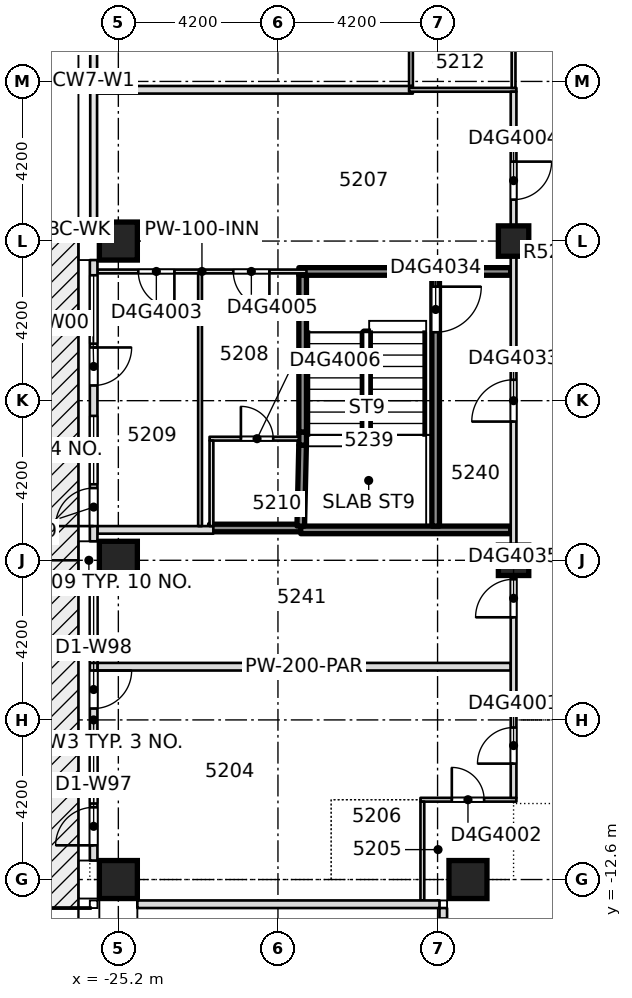
"""IFC4 building model, lengths in metres.
Left out: names, types, materials, properties, quantities, classifications, styles, units other than length and angle.
Written with IfcOpenShell. Run it as: python <this file> out.ifc"""

import sys

from ifc_helpers import new_model, si_unit, direction, frame, frame_2d, origin, origin_2d, place, context, subcontext, project, spatial, rectangle, extrude, element, fill, save


model = new_model("IFC4")
c1 = context("Model", 3, precision=1e-05, world=origin(), true_north=direction((0.0, 1.0)))
c2 = subcontext(c1, "Body", "Model", "MODEL_VIEW")
j1 = project(units=[si_unit("LENGTHUNIT", "METRE"), si_unit("PLANEANGLEUNIT", "RADIAN")], contexts=[c1])
p1 = place(None, origin())
s1 = spatial("IfcSite", under=j1, at=p1, CompositionType="ELEMENT")
p2 = place(p1, origin())
s2 = spatial("IfcBuilding", under=s1, at=p2, CompositionType="ELEMENT")
p3 = place(p2, frame((0.0, 0.0, 199.7)))
s3 = spatial("IfcBuildingStorey", under=s2, at=p3, CompositionType="ELEMENT", Elevation=199.7)
for number, where, z_axis, x_axis in (
    (1, (-25.2, -12.6, -0.4), (0.0, 0.0, 1.0), (1.0, 0.0, 0.0)),
    (2, (-16.0, -12.6, -0.4), (0.0, 0.0, 1.0), (1.0, 0.0, 0.0)),
    (3, (-25.2, -4.2, -0.4), (0.0, 0.0, 1.0), (1.0, 0.0, 0.0)),
    (4, (-25.2, 4.2, -0.4), (0.0, 0.0, 1.0), (1.0, 0.0, 0.0)),
):
    element("IfcColumn", number, at=place(p3, frame(where, z_axis=z_axis, x_axis=x_axis)), inside=s3, PredefinedType="COLUMN", context=c2, shape_type="SweptSolid", body=[
        extrude(rectangle(XDim=1.0, YDim=1.0, at=origin_2d()), origin(), (0.0, 0.0, 1.0), 3.45),
    ])
for number, where, z_axis, x_axis in (
    (5, (-14.8, -4.2, -0.4), (0.0, 0.0, 1.0), (1.0, 0.0, 0.0)),
    (6, (-14.8, 4.2, -0.4), (0.0, 0.0, 1.0), (1.0, 0.0, 0.0)),
):
    element("IfcColumn", number, at=place(p3, frame(where, z_axis=z_axis, x_axis=x_axis)), inside=s3, PredefinedType="COLUMN", context=c2, shape_type="SweptSolid", body=[
        extrude(rectangle(XDim=0.8, YDim=0.8, at=origin_2d()), origin(), (0.0, 0.0, 1.0), 3.45),
    ])
p4 = place(p3, frame((-17.25, -10.5, 0.0), z_axis=(0.0, 0.0, 1.0), x_axis=(1.0, 0.0, 0.0)))
e7 = element("IfcWall", 7, at=p4, inside=s3, PredefinedType="PARTITIONING", context=c2, shape_type="SweptSolid", body=[
    extrude(rectangle(XDim=2.525, YDim=0.1, at=frame_2d((1.262, 0.0))), origin(), (0.0, 0.0, 1.0), 3.05),
])
p5 = place(p4, frame((0.825, 0.0, 0.0)))
e8 = element("IfcOpeningElement", 8, at=p5, cuts=e7, PredefinedType="OPENING", context=c2, shape_type="SweptSolid", body=[
    extrude(rectangle(XDim=0.85, YDim=2.1, at=frame_2d((0.425, 1.05))), frame((0.0, 0.06, 0.0), z_axis=(0.0, -1.0, 0.0), x_axis=(1.0, 0.0, 0.0)), (0.0, 0.0, 1.0), 0.12),
])
p6 = place(p3, frame((-25.75, -7.0, 0.0), z_axis=(0.0, 0.0, 1.0), x_axis=(1.0, 0.0, 0.0)))
e9 = element("IfcWall", 9, at=p6, inside=s3, PredefinedType="PARTITIONING", context=c2, shape_type="SweptSolid", body=[
    extrude(rectangle(XDim=10.875, YDim=0.2, at=frame_2d((5.438, 0.0))), origin(), (0.0, 0.0, 1.0), 3.05),
])
p7 = place(p3, frame((-25.75, -3.4, 0.0), z_axis=(0.0, 0.0, 1.0), x_axis=(1.0, 0.0, 0.0)))
e10 = element("IfcWall", 10, at=p7, inside=s3, PredefinedType="PARTITIONING", context=c2, shape_type="SweptSolid", body=[
    extrude(rectangle(XDim=3.05, YDim=0.2, at=frame_2d((1.525, 0.0))), origin(), (0.0, 0.0, 1.0), 3.05),
])
p8 = place(p3, frame((-22.8, -3.35, 0.0), z_axis=(0.0, 0.0, 1.0), x_axis=(1.0, 0.0, 0.0)))
e11 = element("IfcWall", 11, at=p8, inside=s3, PredefinedType="SOLIDWALL", context=c2, shape_type="SweptSolid", body=[
    extrude(rectangle(XDim=2.5, YDim=0.2, at=frame_2d((1.25, 0.0))), origin(), (0.0, 0.0, 1.0), 3.05),
])
p9 = place(p3, frame((-20.4, -3.4, 0.0), z_axis=(0.0, 0.0, 1.0), x_axis=(1.0, 0.0, 0.0)))
e12 = element("IfcWall", 12, at=p9, inside=s3, PredefinedType="SOLIDWALL", context=c2, shape_type="SweptSolid", body=[
    extrude(rectangle(XDim=5.525, YDim=0.2, at=frame_2d((2.762, 0.0))), origin(), (0.0, 0.0, 1.0), 3.05),
])
p10 = place(p3, frame((-22.8, -1.0, 0.0), z_axis=(0.0, 0.0, 1.0), x_axis=(1.0, 0.0, 0.0)))
e13 = element("IfcWall", 13, at=p10, inside=s3, PredefinedType="PARTITIONING", context=c2, shape_type="SweptSolid", body=[
    extrude(rectangle(XDim=2.35, YDim=0.1, at=frame_2d((1.175, 0.0))), origin(), (0.0, 0.0, 1.0), 3.05),
])
p11 = place(p10, frame((0.825, 0.0, 0.0)))
e14 = element("IfcOpeningElement", 14, at=p11, cuts=e13, PredefinedType="OPENING", context=c2, shape_type="SweptSolid", body=[
    extrude(rectangle(XDim=0.85, YDim=2.1, at=frame_2d((0.425, 1.05))), frame((0.0, 0.06, 0.0), z_axis=(0.0, -1.0, 0.0), x_axis=(1.0, 0.0, 0.0)), (0.0, 0.0, 1.0), 0.12),
])
p12 = place(p3, frame((-25.75, 3.4, 0.0), z_axis=(0.0, 0.0, 1.0), x_axis=(1.0, 0.0, 0.0)))
e15 = element("IfcWall", 15, at=p12, inside=s3, PredefinedType="PARTITIONING", context=c2, shape_type="SweptSolid", body=[
    extrude(rectangle(XDim=5.5, YDim=0.1, at=frame_2d((2.75, 0.0))), origin(), (0.0, 0.0, 1.0), 3.05),
])
p13 = place(p12, frame((1.075, 0.0, 0.0)))
e16 = element("IfcOpeningElement", 16, at=p13, cuts=e15, PredefinedType="OPENING", context=c2, shape_type="SweptSolid", body=[
    extrude(rectangle(XDim=0.95, YDim=2.1, at=frame_2d((0.475, 1.05))), frame((0.0, 0.06, 0.0), z_axis=(0.0, -1.0, 0.0), x_axis=(1.0, 0.0, 0.0)), (0.0, 0.0, 1.0), 0.12),
])
p14 = place(p12, frame((3.575, 0.0, 0.0)))
e17 = element("IfcOpeningElement", 17, at=p14, cuts=e15, PredefinedType="OPENING", context=c2, shape_type="SweptSolid", body=[
    extrude(rectangle(XDim=0.95, YDim=2.1, at=frame_2d((0.475, 1.05))), frame((0.0, 0.06, 0.0), z_axis=(0.0, -1.0, 0.0), x_axis=(1.0, 0.0, 0.0)), (0.0, 0.0, 1.0), 0.12),
])
p15 = place(p3, frame((-20.45, 3.4, 0.0), z_axis=(0.0, 0.0, 1.0), x_axis=(1.0, 0.0, 0.0)))
e18 = element("IfcWall", 18, at=p15, inside=s3, PredefinedType="SOLIDWALL", context=c2, shape_type="SweptSolid", body=[
    extrude(rectangle(XDim=5.575, YDim=0.2, at=frame_2d((2.788, 0.0))), origin(), (0.0, 0.0, 1.0), 3.05),
])
p16 = place(p3, frame((-25.75, 8.18, 0.0), z_axis=(0.0, 0.0, 1.0), x_axis=(1.0, 0.0, 0.0)))
e19 = element("IfcWall", 19, at=p16, inside=s3, PredefinedType="PARTITIONING", context=c2, shape_type="SweptSolid", body=[
    extrude(rectangle(XDim=8.3, YDim=0.2, at=frame_2d((4.15, 0.0))), origin(), (0.0, 0.0, 1.0), 3.05),
])
p17 = place(p3, frame((-17.55, 8.18, 0.0), z_axis=(0.0, 0.0, 1.0), x_axis=(1.0, 0.0, 0.0)))
e20 = element("IfcWall", 20, at=p17, inside=s3, PredefinedType="PARTITIONING", context=c2, shape_type="SweptSolid", body=[
    extrude(rectangle(XDim=2.825, YDim=0.1, at=frame_2d((1.413, 0.0))), origin(), (0.0, 0.0, 1.0), 3.05),
])
p18 = place(p3, frame((-23.05, -3.3, 0.0), z_axis=(0.0, 0.0, 1.0), x_axis=(0.0, 1.0, 0.0)))
e21 = element("IfcWall", 21, at=p18, inside=s3, PredefinedType="PARTITIONING", context=c2, shape_type="SweptSolid", body=[
    extrude(rectangle(XDim=6.65, YDim=0.1, at=frame_2d((3.325, 0.0))), origin(), (0.0, 0.0, 1.0), 3.05),
])
p19 = place(p3, frame((-22.75, -3.3, 0.0), z_axis=(0.0, 0.0, 1.0), x_axis=(0.0, 1.0, 0.0)))
e22 = element("IfcWall", 22, at=p19, inside=s3, PredefinedType="PARTITIONING", context=c2, shape_type="SweptSolid", body=[
    extrude(rectangle(XDim=2.25, YDim=0.1, at=frame_2d((1.125, 0.0))), origin(), (0.0, 0.0, 1.0), 3.05),
])
p20 = place(p3, frame((-20.4, -3.3, 0.0), z_axis=(0.0, 0.0, 1.0), x_axis=(0.022687568549, 0.99974260399, 0.0)))
e23 = element("IfcWall", 23, at=p20, inside=s3, PredefinedType="SOLIDWALL", context=c2, shape_type="SweptSolid", body=[
    extrude(rectangle(XDim=2.131, YDim=0.2, at=frame_2d((1.065, 0.0))), origin(), (0.0, 0.0, 1.0), 3.05),
])
p21 = place(p3, frame((-20.35, -0.83, 0.0), z_axis=(0.0, 0.0, 1.0), x_axis=(0.0, 1.0, 0.0)))
e24 = element("IfcWall", 24, at=p21, inside=s3, PredefinedType="SOLIDWALL", context=c2, shape_type="SweptSolid", body=[
    extrude(rectangle(XDim=4.13, YDim=0.2, at=frame_2d((2.065, 0.0))), origin(), (0.0, 0.0, 1.0), 3.05),
])
p22 = place(p3, frame((-17.5, 8.28, 0.0), z_axis=(0.0, 0.0, 1.0), x_axis=(0.0, 1.0, 0.0)))
e25 = element("IfcWall", 25, at=p22, inside=s3, PredefinedType="PARTITIONING", context=c2, shape_type="SweptSolid", body=[
    extrude(rectangle(XDim=2.25, YDim=0.1, at=frame_2d((1.125, 0.0))), origin(), (0.0, 0.0, 1.0), 3.05),
])
p23 = place(p3, frame((-17.2, -13.15, 0.0), z_axis=(0.0, 0.0, 1.0), x_axis=(0.0, 1.0, 0.0)))
e26 = element("IfcWall", 26, at=p23, inside=s3, PredefinedType="PARTITIONING", context=c2, shape_type="SweptSolid", body=[
    extrude(rectangle(XDim=2.6, YDim=0.1, at=frame_2d((1.3, 0.0))), origin(), (0.0, 0.0, 1.0), 3.05),
])
p24 = place(p3, frame((-16.85, -3.3, 0.0), z_axis=(0.0, 0.0, 1.0), x_axis=(0.0, 1.0, 0.0)))
e27 = element("IfcWall", 27, at=p24, inside=s3, PredefinedType="SOLIDWALL", context=c2, shape_type="SweptSolid", body=[
    extrude(rectangle(XDim=6.6, YDim=0.2, at=frame_2d((3.3, 0.0))), origin(), (0.0, 0.0, 1.0), 3.05),
])
p25 = place(p24, frame((5.1, 0.0, 0.0)))
e28 = element("IfcOpeningElement", 28, at=p25, cuts=e27, PredefinedType="OPENING", context=c2, shape_type="SweptSolid", body=[
    extrude(rectangle(XDim=1.2, YDim=2.1, at=frame_2d((0.6, 1.05))), frame((0.0, 0.11, 0.0), z_axis=(0.0, -1.0, 0.0), x_axis=(1.0, 0.0, 0.0)), (0.0, 0.0, 1.0), 0.22),
])
p26 = place(p3, frame((-14.8, -10.45, 0.0), z_axis=(0.0, 0.0, 1.0), x_axis=(0.0, 1.0, 0.0)))
e29 = element("IfcWall", 29, at=p26, inside=s3, PredefinedType="PARTITIONING", context=c2, shape_type="SweptSolid", body=[
    extrude(rectangle(XDim=18.58, YDim=0.15, at=frame_2d((9.29, 0.0))), origin(), (0.0, 0.0, 1.0), 3.05),
])
p27 = place(p26, frame((0.9, 0.0, 0.0)))
e30 = element("IfcOpeningElement", 30, at=p27, cuts=e29, PredefinedType="OPENING", context=c2, shape_type="SweptSolid", body=[
    extrude(rectangle(XDim=0.95, YDim=2.1, at=frame_2d((0.475, 1.05))), frame((0.0, 0.085, 0.0), z_axis=(0.0, -1.0, 0.0), x_axis=(1.0, 0.0, 0.0)), (0.0, 0.0, 1.0), 0.17),
])
p28 = place(p26, frame((15.74, 0.0, 0.0)))
e31 = element("IfcOpeningElement", 31, at=p28, cuts=e29, PredefinedType="OPENING", context=c2, shape_type="SweptSolid", body=[
    extrude(rectangle(XDim=1.0, YDim=2.1, at=frame_2d((0.5, 1.05))), frame((0.0, 0.085, 0.0), z_axis=(0.0, -1.0, 0.0), x_axis=(1.0, 0.0, 0.0)), (0.0, 0.0, 1.0), 0.17),
])
p29 = place(p26, frame((9.9, 0.0, 0.0)))
e32 = element("IfcOpeningElement", 32, at=p29, cuts=e29, PredefinedType="OPENING", context=c2, shape_type="SweptSolid", body=[
    extrude(rectangle(XDim=1.1, YDim=2.1, at=frame_2d((0.55, 1.05))), frame((0.0, 0.085, 0.0), z_axis=(0.0, -1.0, 0.0), x_axis=(1.0, 0.0, 0.0)), (0.0, 0.0, 1.0), 0.17),
])
p30 = place(p26, frame((4.75, 0.0, 0.0)))
e33 = element("IfcOpeningElement", 33, at=p30, cuts=e29, PredefinedType="OPENING", context=c2, shape_type="SweptSolid", body=[
    extrude(rectangle(XDim=1.0, YDim=2.1, at=frame_2d((0.5, 1.05))), frame((0.0, 0.085, 0.0), z_axis=(0.0, -1.0, 0.0), x_axis=(1.0, 0.0, 0.0)), (0.0, 0.0, 1.0), 0.17),
])
p31 = place(p3, frame((-14.8, 8.23, 0.0), z_axis=(0.0, 0.0, 1.0), x_axis=(0.0, 1.0, 0.0)))
e34 = element("IfcWall", 34, at=p31, inside=s3, PredefinedType="PARTITIONING", context=c2, shape_type="SweptSolid", body=[
    extrude(rectangle(XDim=2.3, YDim=0.1, at=frame_2d((1.15, 0.0))), origin(), (0.0, 0.0, 1.0), 3.05),
])
p32 = place(p3, frame((-25.85, 3.7, 0.0), z_axis=(0.0, 0.0, 1.0), x_axis=(0.0, -1.0, 0.0)))
e35 = element("IfcWall", 35, at=p32, inside=s3, PredefinedType="STANDARD", context=c2, shape_type="SweptSolid", body=[
    extrude(rectangle(XDim=7.4, YDim=0.2, at=frame_2d((3.7, 0.0))), origin(), (0.0, 0.0, 1.0), 3.05),
])
p33 = place(p32, frame((4.1, 0.0, 0.2)))
e36 = element("IfcOpeningElement", 36, at=p33, cuts=e35, PredefinedType="OPENING", context=c2, shape_type="SweptSolid", body=[
    extrude(rectangle(XDim=1.8, YDim=2.65, at=frame_2d((0.9, 1.325))), frame((0.0, 0.11, 0.0), z_axis=(0.0, -1.0, 0.0), x_axis=(1.0, 0.0, 0.0)), (0.0, 0.0, 1.0), 0.22),
])
p34 = place(p32, frame((6.0, 0.0, 0.0)))
e37 = element("IfcOpeningElement", 37, at=p34, cuts=e35, PredefinedType="OPENING", context=c2, shape_type="SweptSolid", body=[
    extrude(rectangle(XDim=1.0, YDim=2.4, at=frame_2d((0.5, 1.2))), frame((0.0, 0.11, 0.0), z_axis=(0.0, -1.0, 0.0), x_axis=(1.0, 0.0, 0.0)), (0.0, 0.0, 1.0), 0.22),
])
p35 = place(p32, frame((0.4, 0.0, 0.2)))
e38 = element("IfcOpeningElement", 38, at=p35, cuts=e35, PredefinedType="OPENING", context=c2, shape_type="SweptSolid", body=[
    extrude(rectangle(XDim=1.8, YDim=2.65, at=frame_2d((0.9, 1.325))), frame((0.0, 0.11, 0.0), z_axis=(0.0, -1.0, 0.0), x_axis=(1.0, 0.0, 0.0)), (0.0, 0.0, 1.0), 0.22),
])
p36 = place(p32, frame((2.3, 0.0, 0.0)))
e39 = element("IfcOpeningElement", 39, at=p36, cuts=e35, PredefinedType="OPENING", context=c2, shape_type="SweptSolid", body=[
    extrude(rectangle(XDim=1.0, YDim=2.4, at=frame_2d((0.5, 1.2))), frame((0.0, 0.11, 0.0), z_axis=(0.0, -1.0, 0.0), x_axis=(1.0, 0.0, 0.0)), (0.0, 0.0, 1.0), 0.22),
])
p37 = place(p3, frame((-25.85, -4.7, 0.0), z_axis=(0.0, 0.0, 1.0), x_axis=(0.0, -1.0, 0.0)))
e40 = element("IfcWall", 40, at=p37, inside=s3, PredefinedType="STANDARD", context=c2, shape_type="SweptSolid", body=[
    extrude(rectangle(XDim=7.4, YDim=0.2, at=frame_2d((3.7, 0.0))), origin(), (0.0, 0.0, 1.0), 3.05),
])
p38 = place(p37, frame((4.1, 0.0, 0.2)))
e41 = element("IfcOpeningElement", 41, at=p38, cuts=e40, PredefinedType="OPENING", context=c2, shape_type="SweptSolid", body=[
    extrude(rectangle(XDim=1.8, YDim=2.65, at=frame_2d((0.9, 1.325))), frame((0.0, 0.11, 0.0), z_axis=(0.0, -1.0, 0.0), x_axis=(1.0, 0.0, 0.0)), (0.0, 0.0, 1.0), 0.22),
])
p39 = place(p37, frame((6.0, 0.0, 0.0)))
e42 = element("IfcOpeningElement", 42, at=p39, cuts=e40, PredefinedType="OPENING", context=c2, shape_type="SweptSolid", body=[
    extrude(rectangle(XDim=1.0, YDim=2.4, at=frame_2d((0.5, 1.2))), frame((0.0, 0.11, 0.0), z_axis=(0.0, -1.0, 0.0), x_axis=(1.0, 0.0, 0.0)), (0.0, 0.0, 1.0), 0.22),
])
p40 = place(p37, frame((0.4, 0.0, 0.2)))
e43 = element("IfcOpeningElement", 43, at=p40, cuts=e40, PredefinedType="OPENING", context=c2, shape_type="SweptSolid", body=[
    extrude(rectangle(XDim=1.8, YDim=2.65, at=frame_2d((0.9, 1.325))), frame((0.0, 0.11, 0.0), z_axis=(0.0, -1.0, 0.0), x_axis=(1.0, 0.0, 0.0)), (0.0, 0.0, 1.0), 0.22),
])
p41 = place(p37, frame((2.4, 0.0, 0.0)))
e44 = element("IfcOpeningElement", 44, at=p41, cuts=e40, PredefinedType="OPENING", context=c2, shape_type="SweptSolid", body=[
    extrude(rectangle(XDim=1.0, YDim=2.4, at=frame_2d((0.5, 1.2))), frame((0.0, 0.11, 0.0), z_axis=(0.0, -1.0, 0.0), x_axis=(1.0, 0.0, 0.0)), (0.0, 0.0, 1.0), 0.22),
])
p42 = place(p3, frame((-24.7, -13.25, 0.0), z_axis=(0.0, 0.0, 1.0), x_axis=(1.0, 0.0, 0.0)))
e45 = element("IfcWall", 45, at=p42, inside=s3, PredefinedType="STANDARD", context=c2, shape_type="SweptSolid", body=[
    extrude(rectangle(XDim=7.95, YDim=0.2, at=frame_2d((3.975, 0.0))), origin(), (0.0, 0.0, 1.0), 3.05),
])
p43 = place(p3, frame((-16.65, -13.35, 0.0), z_axis=(0.0, 0.0, 1.0), x_axis=(0.0, -1.0, 0.0)))
e46 = element("IfcWall", 46, at=p43, inside=s3, PredefinedType="STANDARD", context=c2, shape_type="SweptSolid", body=[
    extrude(rectangle(XDim=7.15, YDim=0.2, at=frame_2d((3.575, 0.0))), origin(), (0.0, 0.0, 1.0), 3.05),
])
p44 = place(p43, frame((3.85, 0.0, 0.2)))
e47 = element("IfcOpeningElement", 47, at=p44, cuts=e46, PredefinedType="OPENING", context=c2, shape_type="SweptSolid", body=[
    extrude(rectangle(XDim=1.8, YDim=2.65, at=frame_2d((0.9, 1.325))), frame((0.0, 0.11, 0.0), z_axis=(0.0, -1.0, 0.0), x_axis=(1.0, 0.0, 0.0)), (0.0, 0.0, 1.0), 0.22),
])
p45 = place(p43, frame((0.275, 0.0, 0.2)))
e48 = element("IfcOpeningElement", 48, at=p45, cuts=e46, PredefinedType="OPENING", context=c2, shape_type="SweptSolid", body=[
    extrude(rectangle(XDim=1.8, YDim=2.65, at=frame_2d((0.9, 1.325))), frame((0.0, 0.11, 0.0), z_axis=(0.0, -1.0, 0.0), x_axis=(1.0, 0.0, 0.0)), (0.0, 0.0, 1.0), 0.22),
])
p46 = place(p3, frame((-20.35, -1.17, 0.0), z_axis=(0.0, 0.0, 1.0), x_axis=(0.0, 1.0, 0.0)))
e49 = element("IfcWall", 49, at=p46, inside=s3, PredefinedType="SOLIDWALL", context=c2, shape_type="SweptSolid", body=[
    extrude(rectangle(XDim=0.34, YDim=0.2, at=frame_2d((0.17, 0.0))), origin(), (0.0, 0.0, 1.0), 3.05),
])
p47 = place(p27, origin())
e50 = element("IfcDoor", 50, at=p47, inside=s3, OperationType="SINGLE_SWING_LEFT", PredefinedType="DOOR", context=c2, shape_type="SweptSolid", body=[
    extrude(rectangle(XDim=0.95, YDim=2.1, at=frame_2d((0.475, 1.05))), frame((0.0, 0.025, 0.0), z_axis=(0.0, -1.0, 0.0), x_axis=(1.0, 0.0, 0.0)), (0.0, 0.0, 1.0), 0.05),
])
fill(e30, e50)
p48 = place(p5, origin())
e51 = element("IfcDoor", 51, at=p48, inside=s3, OperationType="SINGLE_SWING_RIGHT", PredefinedType="DOOR", context=c2, shape_type="SweptSolid", body=[
    extrude(rectangle(XDim=0.85, YDim=2.1, at=frame_2d((0.425, 1.05))), frame((0.0, 0.025, 0.0), z_axis=(0.0, -1.0, 0.0), x_axis=(1.0, 0.0, 0.0)), (0.0, 0.0, 1.0), 0.05),
])
fill(e8, e51)
p49 = place(p13, origin())
e52 = element("IfcDoor", 52, at=p49, inside=s3, OperationType="SINGLE_SWING_RIGHT", PredefinedType="DOOR", context=c2, shape_type="SweptSolid", body=[
    extrude(rectangle(XDim=0.95, YDim=2.1, at=frame_2d((0.475, 1.05))), frame((0.0, 0.025, 0.0), z_axis=(0.0, -1.0, 0.0), x_axis=(1.0, 0.0, 0.0)), (0.0, 0.0, 1.0), 0.05),
])
fill(e16, e52)
p50 = place(p28, origin())
e53 = element("IfcDoor", 53, at=p50, inside=s3, OperationType="SINGLE_SWING_RIGHT", PredefinedType="DOOR", context=c2, shape_type="SweptSolid", body=[
    extrude(rectangle(XDim=1.0, YDim=2.1, at=frame_2d((0.5, 1.05))), frame((0.0, 0.025, 0.0), z_axis=(0.0, -1.0, 0.0), x_axis=(1.0, 0.0, 0.0)), (0.0, 0.0, 1.0), 0.05),
])
fill(e31, e53)
p51 = place(p14, origin())
e54 = element("IfcDoor", 54, at=p51, inside=s3, OperationType="SINGLE_SWING_RIGHT", PredefinedType="DOOR", context=c2, shape_type="SweptSolid", body=[
    extrude(rectangle(XDim=0.95, YDim=2.1, at=frame_2d((0.475, 1.05))), frame((0.0, 0.025, 0.0), z_axis=(0.0, -1.0, 0.0), x_axis=(1.0, 0.0, 0.0)), (0.0, 0.0, 1.0), 0.05),
])
fill(e17, e54)
p52 = place(p11, origin())
e55 = element("IfcDoor", 55, at=p52, inside=s3, OperationType="SINGLE_SWING_RIGHT", PredefinedType="DOOR", context=c2, shape_type="SweptSolid", body=[
    extrude(rectangle(XDim=0.85, YDim=2.1, at=frame_2d((0.425, 1.05))), frame((0.0, 0.025, 0.0), z_axis=(0.0, -1.0, 0.0), x_axis=(1.0, 0.0, 0.0)), (0.0, 0.0, 1.0), 0.05),
])
fill(e14, e55)
p53 = place(p29, origin())
e56 = element("IfcDoor", 56, at=p53, inside=s3, OperationType="SINGLE_SWING_RIGHT", PredefinedType="DOOR", context=c2, shape_type="SweptSolid", body=[
    extrude(rectangle(XDim=1.1, YDim=2.1, at=frame_2d((0.55, 1.05))), frame((0.0, 0.025, 0.0), z_axis=(0.0, -1.0, 0.0), x_axis=(1.0, 0.0, 0.0)), (0.0, 0.0, 1.0), 0.05),
])
fill(e32, e56)
p54 = place(p25, origin())
e57 = element("IfcDoor", 57, at=p54, inside=s3, OperationType="SINGLE_SWING_RIGHT", PredefinedType="DOOR", context=c2, shape_type="SweptSolid", body=[
    extrude(rectangle(XDim=1.2, YDim=2.1, at=frame_2d((0.6, 1.05))), frame((0.0, 0.025, 0.0), z_axis=(0.0, -1.0, 0.0), x_axis=(1.0, 0.0, 0.0)), (0.0, 0.0, 1.0), 0.05),
])
fill(e28, e57)
p55 = place(p30, origin())
e58 = element("IfcDoor", 58, at=p55, inside=s3, OperationType="SINGLE_SWING_LEFT", PredefinedType="DOOR", context=c2, shape_type="SweptSolid", body=[
    extrude(rectangle(XDim=1.0, YDim=2.1, at=frame_2d((0.5, 1.05))), frame((0.0, 0.025, 0.0), z_axis=(0.0, -1.0, 0.0), x_axis=(1.0, 0.0, 0.0)), (0.0, 0.0, 1.0), 0.05),
])
fill(e33, e58)
p56 = place(p33, origin())
e59 = element("IfcWindow", 59, at=p56, inside=s3, PartitioningType="SINGLE_PANEL", PredefinedType="WINDOW", context=c2, shape_type="SweptSolid", body=[
    extrude(rectangle(XDim=1.8, YDim=2.65, at=frame_2d((0.9, 1.325))), frame((0.0, 0.03, 0.0), z_axis=(0.0, -1.0, 0.0), x_axis=(1.0, 0.0, 0.0)), (0.0, 0.0, 1.0), 0.06),
])
fill(e36, e59)
p57 = place(p34, origin())
e60 = element("IfcDoor", 60, at=p57, inside=s3, OperationType="SINGLE_SWING_LEFT", PredefinedType="DOOR", context=c2, shape_type="SweptSolid", body=[
    extrude(rectangle(XDim=1.0, YDim=2.4, at=frame_2d((0.5, 1.2))), frame((0.0, 0.025, 0.0), z_axis=(0.0, -1.0, 0.0), x_axis=(1.0, 0.0, 0.0)), (0.0, 0.0, 1.0), 0.05),
])
fill(e37, e60)
p58 = place(p35, origin())
e61 = element("IfcWindow", 61, at=p58, inside=s3, PartitioningType="SINGLE_PANEL", PredefinedType="WINDOW", context=c2, shape_type="SweptSolid", body=[
    extrude(rectangle(XDim=1.8, YDim=2.65, at=frame_2d((0.9, 1.325))), frame((0.0, 0.03, 0.0), z_axis=(0.0, -1.0, 0.0), x_axis=(1.0, 0.0, 0.0)), (0.0, 0.0, 1.0), 0.06),
])
fill(e38, e61)
p59 = place(p36, origin())
e62 = element("IfcDoor", 62, at=p59, inside=s3, OperationType="SINGLE_SWING_LEFT", PredefinedType="DOOR", context=c2, shape_type="SweptSolid", body=[
    extrude(rectangle(XDim=1.0, YDim=2.4, at=frame_2d((0.5, 1.2))), frame((0.0, 0.025, 0.0), z_axis=(0.0, -1.0, 0.0), x_axis=(1.0, 0.0, 0.0)), (0.0, 0.0, 1.0), 0.05),
])
fill(e39, e62)
p60 = place(p38, origin())
e63 = element("IfcWindow", 63, at=p60, inside=s3, PartitioningType="SINGLE_PANEL", PredefinedType="WINDOW", context=c2, shape_type="SweptSolid", body=[
    extrude(rectangle(XDim=1.8, YDim=2.65, at=frame_2d((0.9, 1.325))), frame((0.0, 0.03, 0.0), z_axis=(0.0, -1.0, 0.0), x_axis=(1.0, 0.0, 0.0)), (0.0, 0.0, 1.0), 0.06),
])
fill(e41, e63)
p61 = place(p39, origin())
e64 = element("IfcDoor", 64, at=p61, inside=s3, OperationType="SINGLE_SWING_LEFT", PredefinedType="DOOR", context=c2, shape_type="SweptSolid", body=[
    extrude(rectangle(XDim=1.0, YDim=2.4, at=frame_2d((0.5, 1.2))), frame((0.0, 0.025, 0.0), z_axis=(0.0, -1.0, 0.0), x_axis=(1.0, 0.0, 0.0)), (0.0, 0.0, 1.0), 0.05),
])
fill(e42, e64)
p62 = place(p40, origin())
e65 = element("IfcWindow", 65, at=p62, inside=s3, PartitioningType="SINGLE_PANEL", PredefinedType="WINDOW", context=c2, shape_type="SweptSolid", body=[
    extrude(rectangle(XDim=1.8, YDim=2.65, at=frame_2d((0.9, 1.325))), frame((0.0, 0.03, 0.0), z_axis=(0.0, -1.0, 0.0), x_axis=(1.0, 0.0, 0.0)), (0.0, 0.0, 1.0), 0.06),
])
fill(e43, e65)
p63 = place(p41, origin())
e66 = element("IfcDoor", 66, at=p63, inside=s3, OperationType="SINGLE_SWING_LEFT", PredefinedType="DOOR", context=c2, shape_type="SweptSolid", body=[
    extrude(rectangle(XDim=1.0, YDim=2.4, at=frame_2d((0.5, 1.2))), frame((0.0, 0.025, 0.0), z_axis=(0.0, -1.0, 0.0), x_axis=(1.0, 0.0, 0.0)), (0.0, 0.0, 1.0), 0.05),
])
fill(e44, e66)
save(model, sys.argv[1])
